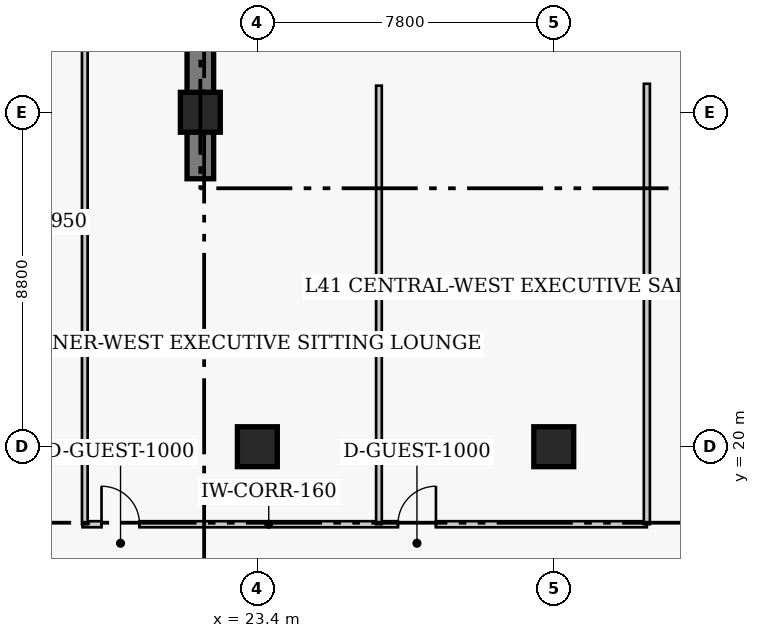
"""IFC4 building model, lengths in metres.
Left out: names, types, materials, properties, quantities, classifications, styles, units other than length and angle.
Written with IfcOpenShell. Run it as: python <this file> out.ifc"""

import sys

from ifc_helpers import new_model, si_unit, direction, frame, frame_2d, origin, origin_2d, place, context, subcontext, project, spatial, rectangle, extrude, element, fill, save


model = new_model("IFC4")
c1 = context("Model", 3, precision=1e-05, world=origin(), true_north=direction((0.0, 1.0)))
c2 = subcontext(c1, "Body", "Model", "MODEL_VIEW")
j1 = project(units=[si_unit("LENGTHUNIT", "METRE"), si_unit("PLANEANGLEUNIT", "RADIAN")], contexts=[c1])
p1 = place(None, origin())
s1 = spatial("IfcSite", under=j1, at=p1, CompositionType="ELEMENT")
p2 = place(p1, origin())
s2 = spatial("IfcBuilding", under=s1, at=p2, CompositionType="ELEMENT")
p3 = place(p2, frame((0.0, 0.0, 165.0)))
s3 = spatial("IfcBuildingStorey", under=s2, at=p3, CompositionType="ELEMENT", Elevation=165.0)
p4 = place(p3, frame((21.9, 27.05, 0.0), z_axis=(0.0, 0.0, 1.0), x_axis=(0.0, 1.0, 0.0)))
e1 = element("IfcWall", 1, at=p4, inside=s3, PredefinedType="SHEAR", context=c2, shape_type="SweptSolid", body=[
    extrude(rectangle(XDim=13.62, YDim=0.7, at=frame_2d((6.81, 0.0))), origin(), (0.0, 0.0, 1.0), 3.8),
])
for number, where, z_axis, x_axis in (
    (2, (23.4, 20.0, 0.0), (0.0, 0.0, 1.0), (1.0, 0.0, 0.0)),
    (3, (31.2, 20.0, 0.0), (0.0, 0.0, 1.0), (1.0, 0.0, 0.0)),
    (4, (21.9, 28.8, 0.0), (0.0, 0.0, 1.0), (1.0, 0.0, 0.0)),
):
    element("IfcColumn", number, at=place(p3, frame(where, z_axis=z_axis, x_axis=x_axis)), inside=s3, PredefinedType="COLUMN", context=c2, shape_type="SweptSolid", body=[
        extrude(rectangle(XDim=1.05, YDim=1.05, at=origin_2d()), origin(), (0.0, 0.0, 1.0), 3.8),
    ])
p5 = place(p3, frame((18.8, 17.96, 0.0), z_axis=(0.0, 0.0, 1.0), x_axis=(1.0, 0.0, 0.0)))
e5 = element("IfcWall", 5, at=p5, inside=s3, PredefinedType="PARTITIONING", context=c2, shape_type="SweptSolid", body=[
    extrude(rectangle(XDim=14.85, YDim=0.16, at=frame_2d((7.425, 0.0))), origin(), (0.0, 0.0, 1.0), 3.55),
])
p6 = place(p5, frame((0.5, 0.0, 0.0)))
e6 = element("IfcOpeningElement", 6, at=p6, cuts=e5, PredefinedType="OPENING", context=c2, shape_type="SweptSolid", body=[
    extrude(rectangle(XDim=1.0, YDim=2.15, at=frame_2d((0.5, 1.075))), frame((0.0, 0.09, 0.0), z_axis=(0.0, -1.0, 0.0), x_axis=(1.0, 0.0, 0.0)), (0.0, 0.0, 1.0), 0.18),
])
p7 = place(p5, frame((8.3, 0.0, 0.0)))
e7 = element("IfcOpeningElement", 7, at=p7, cuts=e5, PredefinedType="OPENING", context=c2, shape_type="SweptSolid", body=[
    extrude(rectangle(XDim=1.0, YDim=2.15, at=frame_2d((0.5, 1.075))), frame((0.0, 0.09, 0.0), z_axis=(0.0, -1.0, 0.0), x_axis=(1.0, 0.0, 0.0)), (0.0, 0.0, 1.0), 0.18),
])
p8 = place(p3, frame((33.65, 17.96, 0.0), z_axis=(0.0, 0.0, 1.0), x_axis=(0.0, 1.0, 0.0)))
e8 = element("IfcWall", 8, at=p8, inside=s3, PredefinedType="PARTITIONING", context=c2, shape_type="SweptSolid", body=[
    extrude(rectangle(XDim=11.59, YDim=0.16, at=frame_2d((5.795, 0.0))), origin(), (0.0, 0.0, 1.0), 3.55),
])
p9 = place(p3, frame((18.86, 17.96, 0.0), z_axis=(0.0, 0.0, 1.0), x_axis=(0.0, 1.0, 0.0)))
e9 = element("IfcWall", 9, at=p9, inside=s3, PredefinedType="PARTITIONING", context=c2, shape_type="SweptSolid", body=[
    extrude(rectangle(XDim=14.84, YDim=0.15, at=frame_2d((7.42, 0.0))), origin(), (0.0, 0.0, 1.0), 3.55),
])
p10 = place(p3, frame((26.6, 17.96, 0.0), z_axis=(0.0, 0.0, 1.0), x_axis=(0.0, 1.0, 0.0)))
e10 = element("IfcWall", 10, at=p10, inside=s3, PredefinedType="PARTITIONING", context=c2, shape_type="SweptSolid", body=[
    extrude(rectangle(XDim=11.54, YDim=0.15, at=frame_2d((5.77, 0.0))), origin(), (0.0, 0.0, 1.0), 3.55),
])
p11 = place(p6, origin())
e11 = element("IfcDoor", 11, at=p11, inside=s3, OperationType="SINGLE_SWING_LEFT", PredefinedType="DOOR", context=c2, shape_type="SweptSolid", body=[
    extrude(rectangle(XDim=1.0, YDim=2.15, at=frame_2d((0.5, 1.075))), frame((0.0, 0.025, 0.0), z_axis=(0.0, -1.0, 0.0), x_axis=(1.0, 0.0, 0.0)), (0.0, 0.0, 1.0), 0.05),
])
fill(e6, e11)
p12 = place(p7, origin())
e12 = element("IfcDoor", 12, at=p12, inside=s3, OperationType="SINGLE_SWING_RIGHT", PredefinedType="DOOR", context=c2, shape_type="SweptSolid", body=[
    extrude(rectangle(XDim=1.0, YDim=2.15, at=frame_2d((0.5, 1.075))), frame((0.0, 0.025, 0.0), z_axis=(0.0, -1.0, 0.0), x_axis=(1.0, 0.0, 0.0)), (0.0, 0.0, 1.0), 0.05),
])
fill(e7, e12)
save(model, sys.argv[1])
